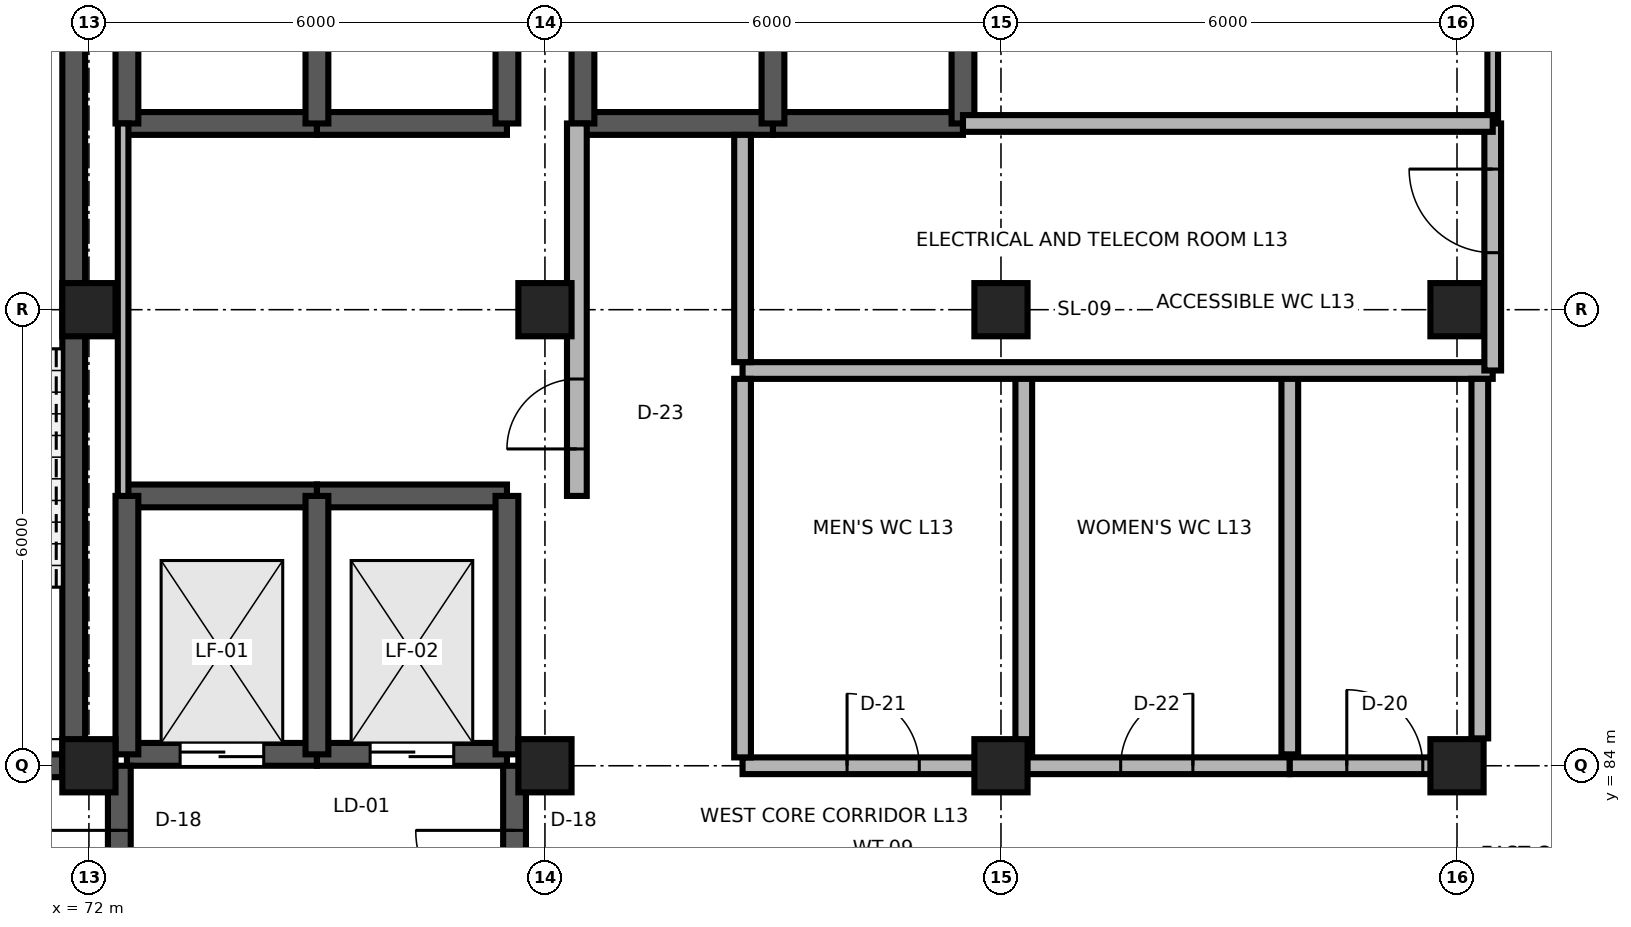
"""IFC4 building model, lengths in metres.
Left out: names, types, materials, properties, quantities, classifications, styles, units other than length and angle.
Written with IfcOpenShell. Run it as: python <this file> out.ifc"""

import sys

from ifc_helpers import new_model, si_unit, direction, frame, frame_2d, origin, origin_2d, place, context, subcontext, project, spatial, rectangle, extrude, element, fill, save


model = new_model("IFC4")
c1 = context("Model", 3, precision=1e-05, world=origin(), true_north=direction((0.0, 1.0)))
c2 = subcontext(c1, "Body", "Model", "MODEL_VIEW")
j1 = project(units=[si_unit("LENGTHUNIT", "METRE"), si_unit("PLANEANGLEUNIT", "RADIAN")], contexts=[c1])
p1 = place(None, origin())
s1 = spatial("IfcSite", under=j1, at=p1, CompositionType="ELEMENT")
p2 = place(p1, origin())
s2 = spatial("IfcBuilding", under=s1, at=p2, CompositionType="ELEMENT")
p3 = place(p2, frame((0.0, 0.0, 52.2)))
s3 = spatial("IfcBuildingStorey", under=s2, at=p3, CompositionType="ELEMENT", Elevation=52.2)
for number, where, z_axis, x_axis in (
    (1, (72.0, 84.0, 0.0), (0.0, 0.0, 1.0), (1.0, 0.0, 0.0)),
    (2, (78.0, 84.0, 0.0), (0.0, 0.0, 1.0), (1.0, 0.0, 0.0)),
    (3, (84.0, 84.0, 0.0), (0.0, 0.0, 1.0), (1.0, 0.0, 0.0)),
    (4, (90.0, 84.0, 0.0), (0.0, 0.0, 1.0), (1.0, 0.0, 0.0)),
    (5, (72.0, 90.0, 0.0), (0.0, 0.0, 1.0), (1.0, 0.0, 0.0)),
    (6, (78.0, 90.0, 0.0), (0.0, 0.0, 1.0), (1.0, 0.0, 0.0)),
    (7, (84.0, 90.0, 0.0), (0.0, 0.0, 1.0), (1.0, 0.0, 0.0)),
    (8, (90.0, 90.0, 0.0), (0.0, 0.0, 1.0), (1.0, 0.0, 0.0)),
):
    element("IfcColumn", number, at=place(p3, frame(where, z_axis=z_axis, x_axis=x_axis)), inside=s3, PredefinedType="COLUMN", context=c2, shape_type="SweptSolid", body=[
        extrude(rectangle(XDim=0.7, YDim=0.7, at=origin_2d()), origin(), (0.0, 0.0, 1.0), 3.9),
    ])
p4 = place(p3, frame((66.35, 84.0, 0.0), z_axis=(0.0, 0.0, 1.0), x_axis=(1.0, 0.0, 0.0)))
e9 = element("IfcWall", 9, at=p4, inside=s3, PredefinedType="SHEAR", context=c2, shape_type="SweptSolid", body=[
    extrude(rectangle(XDim=5.3, YDim=0.3, at=frame_2d((2.65, 0.0))), origin(), (0.0, 0.0, 1.0), 3.66),
])
p5 = place(p4, frame((1.975, 0.0, 0.0)))
e10 = element("IfcOpeningElement", 10, at=p5, cuts=e9, PredefinedType="OPENING", context=c2, shape_type="SweptSolid", body=[
    extrude(rectangle(XDim=1.35, YDim=2.2, at=frame_2d((0.675, 1.1))), frame((0.0, 0.165, 0.0), z_axis=(0.0, -1.0, 0.0), x_axis=(1.0, 0.0, 0.0)), (0.0, 0.0, 1.0), 0.33),
])
p6 = place(p3, frame((71.8, 84.0, 0.0), z_axis=(0.0, 0.0, 1.0), x_axis=(0.0, 1.0, 0.0)))
e11 = element("IfcWall", 11, at=p6, inside=s3, PredefinedType="SHEAR", context=c2, shape_type="SweptSolid", body=[
    extrude(rectangle(XDim=11.8, YDim=0.3, at=frame_2d((5.9, 0.0))), origin(), (0.0, 0.0, 1.0), 3.74),
])
p7 = place(p3, frame((72.5, 84.15, 0.0), z_axis=(0.0, 0.0, 1.0), x_axis=(1.0, 0.0, 0.0)))
e12 = element("IfcWall", 12, at=p7, inside=s3, PredefinedType="SHEAR", context=c2, shape_type="SweptSolid", body=[
    extrude(rectangle(XDim=2.5, YDim=0.3, at=frame_2d((1.25, 0.0))), origin(), (0.0, 0.0, 1.0), 3.74),
])
p8 = place(p7, frame((0.7, 0.0, 0.0)))
e13 = element("IfcOpeningElement", 13, at=p8, cuts=e12, PredefinedType="OPENING", context=c2, shape_type="SweptSolid", body=[
    extrude(rectangle(XDim=1.1, YDim=2.1, at=frame_2d((0.55, 1.05))), frame((0.0, 0.165, 0.0), z_axis=(0.0, -1.0, 0.0), x_axis=(1.0, 0.0, 0.0)), (0.0, 0.0, 1.0), 0.33),
])
p9 = place(p3, frame((72.5, 87.55, 0.0), z_axis=(0.0, 0.0, 1.0), x_axis=(1.0, 0.0, 0.0)))
e14 = element("IfcWall", 14, at=p9, inside=s3, PredefinedType="SHEAR", context=c2, shape_type="SweptSolid", body=[
    extrude(rectangle(XDim=2.5, YDim=0.3, at=frame_2d((1.25, 0.0))), origin(), (0.0, 0.0, 1.0), 3.74),
])
p10 = place(p3, frame((72.5, 84.15, 0.0), z_axis=(0.0, 0.0, 1.0), x_axis=(0.0, 1.0, 0.0)))
e15 = element("IfcWall", 15, at=p10, inside=s3, PredefinedType="SHEAR", context=c2, shape_type="SweptSolid", body=[
    extrude(rectangle(XDim=3.4, YDim=0.3, at=frame_2d((1.7, 0.0))), origin(), (0.0, 0.0, 1.0), 3.74),
])
p11 = place(p3, frame((75.0, 84.15, 0.0), z_axis=(0.0, 0.0, 1.0), x_axis=(1.0, 0.0, 0.0)))
e16 = element("IfcWall", 16, at=p11, inside=s3, PredefinedType="SHEAR", context=c2, shape_type="SweptSolid", body=[
    extrude(rectangle(XDim=2.5, YDim=0.3, at=frame_2d((1.25, 0.0))), origin(), (0.0, 0.0, 1.0), 3.74),
])
p12 = place(p11, frame((0.7, 0.0, 0.0)))
e17 = element("IfcOpeningElement", 17, at=p12, cuts=e16, PredefinedType="OPENING", context=c2, shape_type="SweptSolid", body=[
    extrude(rectangle(XDim=1.1, YDim=2.1, at=frame_2d((0.55, 1.05))), frame((0.0, 0.165, 0.0), z_axis=(0.0, -1.0, 0.0), x_axis=(1.0, 0.0, 0.0)), (0.0, 0.0, 1.0), 0.33),
])
p13 = place(p3, frame((75.0, 87.55, 0.0), z_axis=(0.0, 0.0, 1.0), x_axis=(1.0, 0.0, 0.0)))
e18 = element("IfcWall", 18, at=p13, inside=s3, PredefinedType="SHEAR", context=c2, shape_type="SweptSolid", body=[
    extrude(rectangle(XDim=2.5, YDim=0.3, at=frame_2d((1.25, 0.0))), origin(), (0.0, 0.0, 1.0), 3.74),
])
for number, where, z_axis, x_axis in (
    (19, (75.0, 84.15, 0.0), (0.0, 0.0, 1.0), (0.0, 1.0, 0.0)),
    (20, (77.5, 84.15, 0.0), (0.0, 0.0, 1.0), (0.0, 1.0, 0.0)),
):
    element("IfcWall", number, at=place(p3, frame(where, z_axis=z_axis, x_axis=x_axis)), inside=s3, PredefinedType="SHEAR", context=c2, shape_type="SweptSolid", body=[
        extrude(rectangle(XDim=3.4, YDim=0.3, at=frame_2d((1.7, 0.0))), origin(), (0.0, 0.0, 1.0), 3.74),
    ])
p14 = place(p3, frame((72.5, 92.45, 0.0), z_axis=(0.0, 0.0, 1.0), x_axis=(1.0, 0.0, 0.0)))
e21 = element("IfcWall", 21, at=p14, inside=s3, PredefinedType="SHEAR", context=c2, shape_type="SweptSolid", body=[
    extrude(rectangle(XDim=2.5, YDim=0.3, at=frame_2d((1.25, 0.0))), origin(), (0.0, 0.0, 1.0), 3.74),
])
p15 = place(p3, frame((72.5, 92.45, 0.0), z_axis=(0.0, 0.0, 1.0), x_axis=(0.0, 1.0, 0.0)))
e22 = element("IfcWall", 22, at=p15, inside=s3, PredefinedType="SHEAR", context=c2, shape_type="SweptSolid", body=[
    extrude(rectangle(XDim=3.4, YDim=0.3, at=frame_2d((1.7, 0.0))), origin(), (0.0, 0.0, 1.0), 3.74),
])
p16 = place(p3, frame((75.0, 92.45, 0.0), z_axis=(0.0, 0.0, 1.0), x_axis=(1.0, 0.0, 0.0)))
e23 = element("IfcWall", 23, at=p16, inside=s3, PredefinedType="SHEAR", context=c2, shape_type="SweptSolid", body=[
    extrude(rectangle(XDim=2.5, YDim=0.3, at=frame_2d((1.25, 0.0))), origin(), (0.0, 0.0, 1.0), 3.74),
])
for number, where, z_axis, x_axis in (
    (24, (75.0, 92.45, 0.0), (0.0, 0.0, 1.0), (0.0, 1.0, 0.0)),
    (25, (77.5, 92.45, 0.0), (0.0, 0.0, 1.0), (0.0, 1.0, 0.0)),
):
    element("IfcWall", number, at=place(p3, frame(where, z_axis=z_axis, x_axis=x_axis)), inside=s3, PredefinedType="SHEAR", context=c2, shape_type="SweptSolid", body=[
        extrude(rectangle(XDim=3.4, YDim=0.3, at=frame_2d((1.7, 0.0))), origin(), (0.0, 0.0, 1.0), 3.74),
    ])
p17 = place(p3, frame((78.5, 92.45, 0.0), z_axis=(0.0, 0.0, 1.0), x_axis=(1.0, 0.0, 0.0)))
e26 = element("IfcWall", 26, at=p17, inside=s3, PredefinedType="SHEAR", context=c2, shape_type="SweptSolid", body=[
    extrude(rectangle(XDim=2.5, YDim=0.3, at=frame_2d((1.25, 0.0))), origin(), (0.0, 0.0, 1.0), 3.74),
])
p18 = place(p3, frame((78.5, 92.45, 0.0), z_axis=(0.0, 0.0, 1.0), x_axis=(0.0, 1.0, 0.0)))
e27 = element("IfcWall", 27, at=p18, inside=s3, PredefinedType="SHEAR", context=c2, shape_type="SweptSolid", body=[
    extrude(rectangle(XDim=3.4, YDim=0.3, at=frame_2d((1.7, 0.0))), origin(), (0.0, 0.0, 1.0), 3.74),
])
p19 = place(p3, frame((81.0, 92.45, 0.0), z_axis=(0.0, 0.0, 1.0), x_axis=(1.0, 0.0, 0.0)))
e28 = element("IfcWall", 28, at=p19, inside=s3, PredefinedType="SHEAR", context=c2, shape_type="SweptSolid", body=[
    extrude(rectangle(XDim=2.5, YDim=0.3, at=frame_2d((1.25, 0.0))), origin(), (0.0, 0.0, 1.0), 3.74),
])
for number, where, z_axis, x_axis in (
    (29, (81.0, 92.45, 0.0), (0.0, 0.0, 1.0), (0.0, 1.0, 0.0)),
    (30, (83.5, 92.45, 0.0), (0.0, 0.0, 1.0), (0.0, 1.0, 0.0)),
):
    element("IfcWall", number, at=place(p3, frame(where, z_axis=z_axis, x_axis=x_axis)), inside=s3, PredefinedType="SHEAR", context=c2, shape_type="SweptSolid", body=[
        extrude(rectangle(XDim=3.4, YDim=0.3, at=frame_2d((1.7, 0.0))), origin(), (0.0, 0.0, 1.0), 3.74),
    ])
p20 = place(p3, frame((72.4, 81.0, 0.0), z_axis=(0.0, 0.0, 1.0), x_axis=(0.0, 1.0, 0.0)))
e31 = element("IfcWall", 31, at=p20, inside=s3, PredefinedType="SHEAR", context=c2, shape_type="SweptSolid", body=[
    extrude(rectangle(XDim=3.0, YDim=0.3, at=frame_2d((1.5, 0.0))), origin(), (0.0, 0.0, 1.0), 3.74),
])
p21 = place(p20, frame((0.85, 0.0, 0.0)))
e32 = element("IfcOpeningElement", 32, at=p21, cuts=e31, PredefinedType="OPENING", context=c2, shape_type="SweptSolid", body=[
    extrude(rectangle(XDim=1.3, YDim=2.2, at=frame_2d((0.65, 1.1))), frame((0.0, 0.165, 0.0), z_axis=(0.0, -1.0, 0.0), x_axis=(1.0, 0.0, 0.0)), (0.0, 0.0, 1.0), 0.33),
])
p22 = place(p3, frame((77.6, 81.0, 0.0), z_axis=(0.0, 0.0, 1.0), x_axis=(0.0, 1.0, 0.0)))
e33 = element("IfcWall", 33, at=p22, inside=s3, PredefinedType="SHEAR", context=c2, shape_type="SweptSolid", body=[
    extrude(rectangle(XDim=3.0, YDim=0.3, at=frame_2d((1.5, 0.0))), origin(), (0.0, 0.0, 1.0), 3.74),
])
p23 = place(p22, frame((0.85, 0.0, 0.0)))
e34 = element("IfcOpeningElement", 34, at=p23, cuts=e33, PredefinedType="OPENING", context=c2, shape_type="SweptSolid", body=[
    extrude(rectangle(XDim=1.3, YDim=2.2, at=frame_2d((0.65, 1.1))), frame((0.0, 0.165, 0.0), z_axis=(0.0, -1.0, 0.0), x_axis=(1.0, 0.0, 0.0)), (0.0, 0.0, 1.0), 0.33),
])
p24 = place(p3, frame((80.6, 84.0, 0.0), z_axis=(0.0, 0.0, 1.0), x_axis=(1.0, 0.0, 0.0)))
e35 = element("IfcWall", 35, at=p24, inside=s3, PredefinedType="PARTITIONING", context=c2, shape_type="SweptSolid", body=[
    extrude(rectangle(XDim=3.7, YDim=0.22, at=frame_2d((1.85, 0.0))), origin(), (0.0, 0.0, 1.0), 3.449),
])
p25 = place(p24, frame((1.375, 0.0, 0.0)))
e36 = element("IfcOpeningElement", 36, at=p25, cuts=e35, PredefinedType="OPENING", context=c2, shape_type="SweptSolid", body=[
    extrude(rectangle(XDim=0.95, YDim=2.15, at=frame_2d((0.475, 1.075))), frame((0.0, 0.125, 0.0), z_axis=(0.0, -1.0, 0.0), x_axis=(1.0, 0.0, 0.0)), (0.0, 0.0, 1.0), 0.25),
])
p26 = place(p3, frame((84.3, 84.0, 0.0), z_axis=(0.0, 0.0, 1.0), x_axis=(1.0, 0.0, 0.0)))
e37 = element("IfcWall", 37, at=p26, inside=s3, PredefinedType="PARTITIONING", context=c2, shape_type="SweptSolid", body=[
    extrude(rectangle(XDim=3.5, YDim=0.22, at=frame_2d((1.75, 0.0))), origin(), (0.0, 0.0, 1.0), 3.449),
])
p27 = place(p26, frame((1.275, 0.0, 0.0)))
e38 = element("IfcOpeningElement", 38, at=p27, cuts=e37, PredefinedType="OPENING", context=c2, shape_type="SweptSolid", body=[
    extrude(rectangle(XDim=0.95, YDim=2.1, at=frame_2d((0.475, 1.05))), frame((0.0, 0.125, 0.0), z_axis=(0.0, -1.0, 0.0), x_axis=(1.0, 0.0, 0.0)), (0.0, 0.0, 1.0), 0.25),
])
p28 = place(p3, frame((87.8, 84.0, 0.0), z_axis=(0.0, 0.0, 1.0), x_axis=(1.0, 0.0, 0.0)))
e39 = element("IfcWall", 39, at=p28, inside=s3, PredefinedType="PARTITIONING", context=c2, shape_type="SweptSolid", body=[
    extrude(rectangle(XDim=2.5, YDim=0.22, at=frame_2d((1.25, 0.0))), origin(), (0.0, 0.0, 1.0), 3.449),
])
p29 = place(p28, frame((0.75, 0.0, 0.0)))
e40 = element("IfcOpeningElement", 40, at=p29, cuts=e39, PredefinedType="OPENING", context=c2, shape_type="SweptSolid", body=[
    extrude(rectangle(XDim=1.0, YDim=2.15, at=frame_2d((0.5, 1.075))), frame((0.0, 0.125, 0.0), z_axis=(0.0, -1.0, 0.0), x_axis=(1.0, 0.0, 0.0)), (0.0, 0.0, 1.0), 0.25),
])
for number, where, z_axis, x_axis in (
    (41, (84.3, 84.15, 0.0), (0.0, 0.0, 1.0), (0.0, 1.0, 0.0)),
    (42, (87.8, 84.15, 0.0), (0.0, 0.0, 1.0), (0.0, 1.0, 0.0)),
):
    element("IfcWall", number, at=place(p3, frame(where, z_axis=z_axis, x_axis=x_axis)), inside=s3, PredefinedType="PARTITIONING", context=c2, shape_type="SweptSolid", body=[
        extrude(rectangle(XDim=5.0, YDim=0.22, at=frame_2d((2.5, 0.0))), origin(), (0.0, 0.0, 1.0), 3.74),
    ])
p30 = place(p3, frame((80.6, 89.2, 0.0), z_axis=(0.0, 0.0, 1.0), x_axis=(1.0, 0.0, 0.0)))
e43 = element("IfcWall", 43, at=p30, inside=s3, PredefinedType="PARTITIONING", context=c2, shape_type="SweptSolid", body=[
    extrude(rectangle(XDim=9.87, YDim=0.22, at=frame_2d((4.935, 0.0))), origin(), (0.0, 0.0, 1.0), 3.74),
])
p31 = place(p3, frame((90.47, 89.2, 0.0), z_axis=(0.0, 0.0, 1.0), x_axis=(0.0, 1.0, 0.0)))
e44 = element("IfcWall", 44, at=p31, inside=s3, PredefinedType="PARTITIONING", context=c2, shape_type="SweptSolid", body=[
    extrude(rectangle(XDim=3.25, YDim=0.22, at=frame_2d((1.625, 0.0))), origin(), (0.0, 0.0, 1.0), 3.74),
])
p32 = place(p31, frame((1.55, 0.0, 0.0)))
e45 = element("IfcOpeningElement", 45, at=p32, cuts=e44, PredefinedType="OPENING", context=c2, shape_type="SweptSolid", body=[
    extrude(rectangle(XDim=1.1, YDim=2.15, at=frame_2d((0.55, 1.075))), frame((0.0, 0.125, 0.0), z_axis=(0.0, -1.0, 0.0), x_axis=(1.0, 0.0, 0.0)), (0.0, 0.0, 1.0), 0.25),
])
p33 = place(p3, frame((78.42, 87.55, 0.0), z_axis=(0.0, 0.0, 1.0), x_axis=(0.0, 1.0, 0.0)))
e46 = element("IfcWall", 46, at=p33, inside=s3, PredefinedType="PARTITIONING", context=c2, shape_type="SweptSolid", body=[
    extrude(rectangle(XDim=4.9, YDim=0.26, at=frame_2d((2.45, 0.0))), origin(), (0.0, 0.0, 1.0), 3.74),
])
p34 = place(p33, frame((0.618, 0.0, 0.0)))
e47 = element("IfcOpeningElement", 47, at=p34, cuts=e46, PredefinedType="OPENING", context=c2, shape_type="SweptSolid", body=[
    extrude(rectangle(XDim=0.92, YDim=2.15, at=frame_2d((0.46, 1.075))), frame((0.0, 0.145, 0.0), z_axis=(0.0, -1.0, 0.0), x_axis=(1.0, 0.0, 0.0)), (0.0, 0.0, 1.0), 0.29),
])
p35 = place(p3, frame((90.47, 92.5, 0.0), z_axis=(0.0, 0.0, 1.0), x_axis=(0.0, 1.0, 0.0)))
e48 = element("IfcWall", 48, at=p35, inside=s3, PredefinedType="PARTITIONING", context=c2, shape_type="SweptSolid", body=[
    extrude(rectangle(XDim=3.4, YDim=0.14, at=frame_2d((1.7, 0.0))), origin(), (0.0, 0.0, 1.0), 3.74),
])
p36 = place(p35, frame((1.24, 0.0, 0.0)))
e49 = element("IfcOpeningElement", 49, at=p36, cuts=e48, PredefinedType="OPENING", context=c2, shape_type="SweptSolid", body=[
    extrude(rectangle(XDim=0.92, YDim=2.15, at=frame_2d((0.46, 1.075))), frame((0.0, 0.085, 0.0), z_axis=(0.0, -1.0, 0.0), x_axis=(1.0, 0.0, 0.0)), (0.0, 0.0, 1.0), 0.17),
])
p37 = place(p3, frame((72.45, 87.55, 0.0), z_axis=(0.0, 0.0, 1.0), x_axis=(0.0, 1.0, 0.0)))
e50 = element("IfcWall", 50, at=p37, inside=s3, PredefinedType="PARTITIONING", context=c2, shape_type="SweptSolid", body=[
    extrude(rectangle(XDim=4.9, YDim=0.14, at=frame_2d((2.45, 0.0))), origin(), (0.0, 0.0, 1.0), 3.74),
])
p38 = place(p3, frame((80.6, 84.11, 0.0), z_axis=(0.0, 0.0, 1.0), x_axis=(0.0, 1.0, 0.0)))
e51 = element("IfcWall", 51, at=p38, inside=s3, PredefinedType="PARTITIONING", context=c2, shape_type="SweptSolid", body=[
    extrude(rectangle(XDim=4.98, YDim=0.22, at=frame_2d((2.49, 0.0))), origin(), (0.0, 0.0, 1.0), 3.74),
])
p39 = place(p3, frame((90.3, 84.36, 0.0), z_axis=(0.0, 0.0, 1.0), x_axis=(0.0, 1.0, 0.0)))
e52 = element("IfcWall", 52, at=p39, inside=s3, PredefinedType="PARTITIONING", context=c2, shape_type="SweptSolid", body=[
    extrude(rectangle(XDim=4.73, YDim=0.22, at=frame_2d((2.365, 0.0))), origin(), (0.0, 0.0, 1.0), 3.74),
])
p40 = place(p3, frame((80.6, 89.31, 0.0), z_axis=(0.0, 0.0, 1.0), x_axis=(0.0, 1.0, 0.0)))
e53 = element("IfcWall", 53, at=p40, inside=s3, PredefinedType="PARTITIONING", context=c2, shape_type="SweptSolid", body=[
    extrude(rectangle(XDim=2.99, YDim=0.22, at=frame_2d((1.495, 0.0))), origin(), (0.0, 0.0, 1.0), 3.74),
])
p41 = place(p3, frame((83.5, 92.45, 0.0), z_axis=(0.0, 0.0, 1.0), x_axis=(1.0, 0.0, 0.0)))
e54 = element("IfcWall", 54, at=p41, inside=s3, PredefinedType="PARTITIONING", context=c2, shape_type="SweptSolid", body=[
    extrude(rectangle(XDim=6.97, YDim=0.22, at=frame_2d((3.485, 0.0))), origin(), (0.0, 0.0, 1.0), 3.74),
])
p42 = place(p8, origin())
e55 = element("IfcDoor", 55, at=p42, inside=s3, OperationType="DOUBLE_DOOR_SLIDING", PredefinedType="DOOR", context=c2, shape_type="SweptSolid", body=[
    extrude(rectangle(XDim=1.1, YDim=2.1, at=frame_2d((0.55, 1.05))), frame((0.0, 0.025, 0.0), z_axis=(0.0, -1.0, 0.0), x_axis=(1.0, 0.0, 0.0)), (0.0, 0.0, 1.0), 0.05),
])
fill(e13, e55)
p43 = place(p12, origin())
e56 = element("IfcDoor", 56, at=p43, inside=s3, OperationType="DOUBLE_DOOR_SLIDING", PredefinedType="DOOR", context=c2, shape_type="SweptSolid", body=[
    extrude(rectangle(XDim=1.1, YDim=2.1, at=frame_2d((0.55, 1.05))), frame((0.0, 0.025, 0.0), z_axis=(0.0, -1.0, 0.0), x_axis=(1.0, 0.0, 0.0)), (0.0, 0.0, 1.0), 0.05),
])
fill(e17, e56)
p44 = place(p21, origin())
e57 = element("IfcDoor", 57, at=p44, inside=s3, OperationType="SINGLE_SWING_RIGHT", PredefinedType="DOOR", context=c2, shape_type="SweptSolid", body=[
    extrude(rectangle(XDim=1.3, YDim=2.2, at=frame_2d((0.65, 1.1))), frame((0.0, 0.025, 0.0), z_axis=(0.0, -1.0, 0.0), x_axis=(1.0, 0.0, 0.0)), (0.0, 0.0, 1.0), 0.05),
])
fill(e32, e57)
p45 = place(p23, origin())
e58 = element("IfcDoor", 58, at=p45, inside=s3, OperationType="SINGLE_SWING_RIGHT", PredefinedType="DOOR", context=c2, shape_type="SweptSolid", body=[
    extrude(rectangle(XDim=1.3, YDim=2.2, at=frame_2d((0.65, 1.1))), frame((0.0, 0.025, 0.0), z_axis=(0.0, -1.0, 0.0), x_axis=(1.0, 0.0, 0.0)), (0.0, 0.0, 1.0), 0.05),
])
fill(e34, e58)
p46 = place(p25, origin())
e59 = element("IfcDoor", 59, at=p46, inside=s3, OperationType="SINGLE_SWING_LEFT", PredefinedType="DOOR", context=c2, shape_type="SweptSolid", body=[
    extrude(rectangle(XDim=0.95, YDim=2.15, at=frame_2d((0.475, 1.075))), frame((0.0, 0.025, 0.0), z_axis=(0.0, -1.0, 0.0), x_axis=(1.0, 0.0, 0.0)), (0.0, 0.0, 1.0), 0.05),
])
fill(e36, e59)
p47 = place(p27, origin())
e60 = element("IfcDoor", 60, at=p47, inside=s3, OperationType="SINGLE_SWING_RIGHT", PredefinedType="DOOR", context=c2, shape_type="SweptSolid", body=[
    extrude(rectangle(XDim=0.95, YDim=2.1, at=frame_2d((0.475, 1.05))), frame((0.0, 0.025, 0.0), z_axis=(0.0, -1.0, 0.0), x_axis=(1.0, 0.0, 0.0)), (0.0, 0.0, 1.0), 0.05),
])
fill(e38, e60)
p48 = place(p29, origin())
e61 = element("IfcDoor", 61, at=p48, inside=s3, OperationType="SINGLE_SWING_LEFT", PredefinedType="DOOR", context=c2, shape_type="SweptSolid", body=[
    extrude(rectangle(XDim=1.0, YDim=2.15, at=frame_2d((0.5, 1.075))), frame((0.0, 0.025, 0.0), z_axis=(0.0, -1.0, 0.0), x_axis=(1.0, 0.0, 0.0)), (0.0, 0.0, 1.0), 0.05),
])
fill(e40, e61)
p49 = place(p32, origin())
e62 = element("IfcDoor", 62, at=p49, inside=s3, OperationType="SINGLE_SWING_RIGHT", PredefinedType="DOOR", context=c2, shape_type="SweptSolid", body=[
    extrude(rectangle(XDim=1.1, YDim=2.15, at=frame_2d((0.55, 1.075))), frame((0.0, 0.025, 0.0), z_axis=(0.0, -1.0, 0.0), x_axis=(1.0, 0.0, 0.0)), (0.0, 0.0, 1.0), 0.05),
])
fill(e45, e62)
p50 = place(p34, origin())
e63 = element("IfcDoor", 63, at=p50, inside=s3, OperationType="SINGLE_SWING_LEFT", PredefinedType="DOOR", context=c2, shape_type="SweptSolid", body=[
    extrude(rectangle(XDim=0.92, YDim=2.15, at=frame_2d((0.46, 1.075))), frame((0.0, 0.025, 0.0), z_axis=(0.0, -1.0, 0.0), x_axis=(1.0, 0.0, 0.0)), (0.0, 0.0, 1.0), 0.05),
])
fill(e47, e63)
save(model, sys.argv[1])
